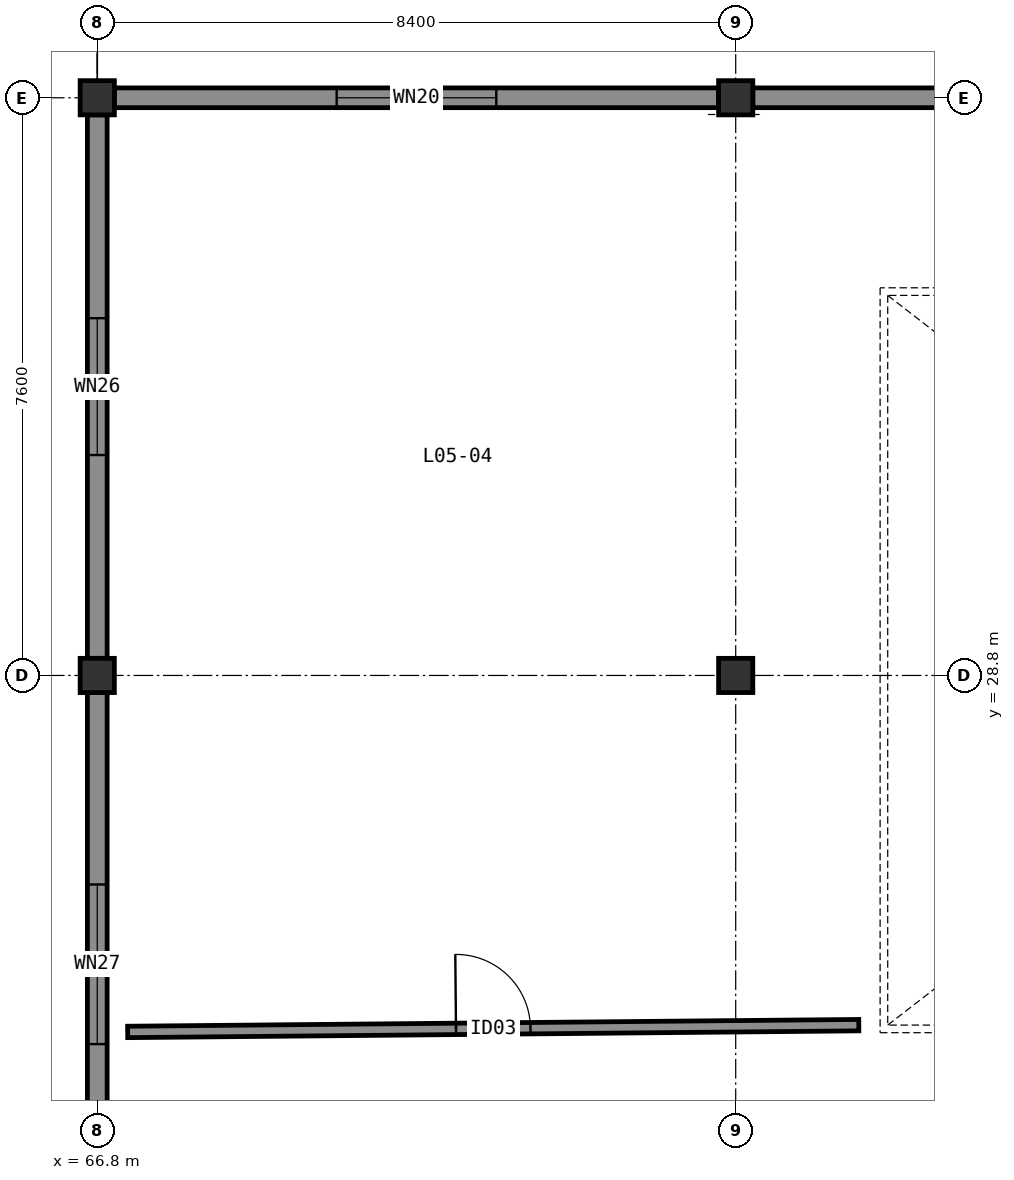
"""IFC4 building model, lengths in metres.
Left out: names, types, materials, properties, quantities, classifications, styles, units other than length and angle.
Written with IfcOpenShell. Run it as: python <this file> out.ifc"""

import sys

from ifc_helpers import new_model, si_unit, direction, frame, frame_2d, origin, origin_2d, place, context, subcontext, project, spatial, rectangle, extrude, element, fill, save


model = new_model("IFC4")
c1 = context("Model", 3, precision=1e-05, world=origin(), true_north=direction((0.0, 1.0)))
c2 = subcontext(c1, "Body", "Model", "MODEL_VIEW")
j1 = project(units=[si_unit("LENGTHUNIT", "METRE"), si_unit("PLANEANGLEUNIT", "RADIAN")], contexts=[c1])
p1 = place(None, origin())
s1 = spatial("IfcSite", under=j1, at=p1, CompositionType="ELEMENT")
p2 = place(p1, origin())
s2 = spatial("IfcBuilding", under=s1, at=p2, CompositionType="ELEMENT")
p3 = place(p2, frame((0.0, 0.0, 22.2)))
s3 = spatial("IfcBuildingStorey", under=s2, at=p3, CompositionType="ELEMENT", Elevation=22.2)
for number, where, z_axis, x_axis in (
    (1, (66.8, 28.8, 0.0), (0.0, 0.0, 1.0), (1.0, 0.0, 0.0)),
    (2, (75.2, 28.8, 0.0), (0.0, 0.0, 1.0), (1.0, 0.0, 0.0)),
    (3, (66.8, 36.4, 0.0), (0.0, 0.0, 1.0), (1.0, 0.0, 0.0)),
    (4, (75.2, 36.4, 0.0), (0.0, 0.0, 1.0), (1.0, 0.0, 0.0)),
):
    element("IfcColumn", number, at=place(p3, frame(where, z_axis=z_axis, x_axis=x_axis)), inside=s3, PredefinedType="COLUMN", context=c2, shape_type="SweptSolid", body=[
        extrude(rectangle(XDim=0.45, YDim=0.45, at=origin_2d()), origin(), (0.0, 0.0, 1.0), 4.2),
    ])
p4 = place(p3, frame((83.375, 36.4, 0.0), z_axis=(0.0, 0.0, 1.0), x_axis=(-1.0, 0.0, 0.0)))
e5 = element("IfcWall", 5, at=p4, inside=s3, PredefinedType="SOLIDWALL", context=c2, shape_type="SweptSolid", body=[
    extrude(rectangle(XDim=7.95, YDim=0.26, at=frame_2d((3.975, 0.0))), origin(), (0.0, 0.0, 1.0), 3.627),
])
p5 = place(p4, frame((3.075, 0.0, 0.95)))
e6 = element("IfcOpeningElement", 6, at=p5, cuts=e5, PredefinedType="OPENING", context=c2, shape_type="SweptSolid", body=[
    extrude(rectangle(XDim=1.8, YDim=2.1, at=frame_2d((0.9, 1.05))), frame((0.0, 0.14, 0.0), z_axis=(0.0, -1.0, 0.0), x_axis=(1.0, 0.0, 0.0)), (0.0, 0.0, 1.0), 0.28),
])
p6 = place(p3, frame((74.975, 36.4, 0.0), z_axis=(0.0, 0.0, 1.0), x_axis=(-1.0, 0.0, 0.0)))
e7 = element("IfcWall", 7, at=p6, inside=s3, PredefinedType="SOLIDWALL", context=c2, shape_type="SweptSolid", body=[
    extrude(rectangle(XDim=7.95, YDim=0.26, at=frame_2d((3.975, 0.0))), origin(), (0.0, 0.0, 1.0), 3.627),
])
p7 = place(p6, frame((2.925, 0.0, 0.95)))
e8 = element("IfcOpeningElement", 8, at=p7, cuts=e7, PredefinedType="OPENING", context=c2, shape_type="SweptSolid", body=[
    extrude(rectangle(XDim=2.1, YDim=2.1, at=frame_2d((1.05, 1.05))), frame((0.0, 0.14, 0.0), z_axis=(0.0, -1.0, 0.0), x_axis=(1.0, 0.0, 0.0)), (0.0, 0.0, 1.0), 0.28),
])
p8 = place(p3, frame((66.8, 36.175, 0.0), z_axis=(0.0, 0.0, 1.0), x_axis=(0.0, -1.0, 0.0)))
e9 = element("IfcWall", 9, at=p8, inside=s3, PredefinedType="SOLIDWALL", context=c2, shape_type="SweptSolid", body=[
    extrude(rectangle(XDim=7.15, YDim=0.26, at=frame_2d((3.575, 0.0))), origin(), (0.0, 0.0, 1.0), 3.315),
])
p9 = place(p8, frame((2.675, 0.0, 0.95)))
e10 = element("IfcOpeningElement", 10, at=p9, cuts=e9, PredefinedType="OPENING", context=c2, shape_type="SweptSolid", body=[
    extrude(rectangle(XDim=1.8, YDim=1.2, at=frame_2d((0.9, 0.6))), frame((0.0, 0.14, 0.0), z_axis=(0.0, -1.0, 0.0), x_axis=(1.0, 0.0, 0.0)), (0.0, 0.0, 1.0), 0.28),
])
p10 = place(p3, frame((66.8, 28.575, 0.0), z_axis=(0.0, 0.0, 1.0), x_axis=(0.0, -1.0, 0.0)))
e11 = element("IfcWall", 11, at=p10, inside=s3, PredefinedType="SOLIDWALL", context=c2, shape_type="SweptSolid", body=[
    extrude(rectangle(XDim=7.15, YDim=0.26, at=frame_2d((3.575, 0.0))), origin(), (0.0, 0.0, 1.0), 3.315),
])
p11 = place(p10, frame((2.525, 0.0, 0.95)))
e12 = element("IfcOpeningElement", 12, at=p11, cuts=e11, PredefinedType="OPENING", context=c2, shape_type="SweptSolid", body=[
    extrude(rectangle(XDim=2.1, YDim=1.2, at=frame_2d((1.05, 0.6))), frame((0.0, 0.14, 0.0), z_axis=(0.0, -1.0, 0.0), x_axis=(1.0, 0.0, 0.0)), (0.0, 0.0, 1.0), 0.28),
])
p12 = place(p3, frame((67.2, 24.11, 0.0), z_axis=(0.0, 0.0, 1.0), x_axis=(0.999957096645, 0.009263091728, 0.0)))
e13 = element("IfcWall", 13, at=p12, inside=s3, PredefinedType="PARTITIONING", context=c2, shape_type="SweptSolid", body=[
    extrude(rectangle(XDim=9.62, YDim=0.15, at=frame_2d((4.81, 0.0))), origin(), (0.0, 0.0, 1.0), 3.95),
])
p13 = place(p12, frame((4.32, 0.0, 0.0)))
e14 = element("IfcOpeningElement", 14, at=p13, cuts=e13, PredefinedType="OPENING", context=c2, shape_type="SweptSolid", body=[
    extrude(rectangle(XDim=0.98, YDim=2.08, at=frame_2d((0.49, 1.04))), frame((0.0, 0.085, 0.0), z_axis=(0.0, -1.0, 0.0), x_axis=(1.0, 0.0, 0.0)), (0.0, 0.0, 1.0), 0.17),
])
p14 = place(p7, origin())
e15 = element("IfcWindow", 15, at=p14, inside=s3, PartitioningType="DOUBLE_PANEL_VERTICAL", PredefinedType="WINDOW", context=c2, shape_type="SweptSolid", body=[
    extrude(rectangle(XDim=2.1, YDim=2.1, at=frame_2d((1.05, 1.05))), frame((0.0, 0.03, 0.0), z_axis=(0.0, -1.0, 0.0), x_axis=(1.0, 0.0, 0.0)), (0.0, 0.0, 1.0), 0.06),
])
fill(e8, e15)
p15 = place(p9, origin())
e16 = element("IfcWindow", 16, at=p15, inside=s3, PartitioningType="DOUBLE_PANEL_VERTICAL", PredefinedType="WINDOW", context=c2, shape_type="SweptSolid", body=[
    extrude(rectangle(XDim=1.8, YDim=1.2, at=frame_2d((0.9, 0.6))), frame((0.0, 0.03, 0.0), z_axis=(0.0, -1.0, 0.0), x_axis=(1.0, 0.0, 0.0)), (0.0, 0.0, 1.0), 0.06),
])
fill(e10, e16)
p16 = place(p11, origin())
e17 = element("IfcWindow", 17, at=p16, inside=s3, PartitioningType="DOUBLE_PANEL_VERTICAL", PredefinedType="WINDOW", context=c2, shape_type="SweptSolid", body=[
    extrude(rectangle(XDim=2.1, YDim=1.2, at=frame_2d((1.05, 0.6))), frame((0.0, 0.03, 0.0), z_axis=(0.0, -1.0, 0.0), x_axis=(1.0, 0.0, 0.0)), (0.0, 0.0, 1.0), 0.06),
])
fill(e12, e17)
p17 = place(p13, origin())
e18 = element("IfcDoor", 18, at=p17, inside=s3, OperationType="SINGLE_SWING_LEFT", PredefinedType="DOOR", context=c2, shape_type="SweptSolid", body=[
    extrude(rectangle(XDim=0.98, YDim=2.08, at=frame_2d((0.49, 1.04))), frame((0.0, 0.025, 0.0), z_axis=(0.0, -1.0, 0.0), x_axis=(1.0, 0.0, 0.0)), (0.0, 0.0, 1.0), 0.05),
])
fill(e14, e18)
save(model, sys.argv[1])
